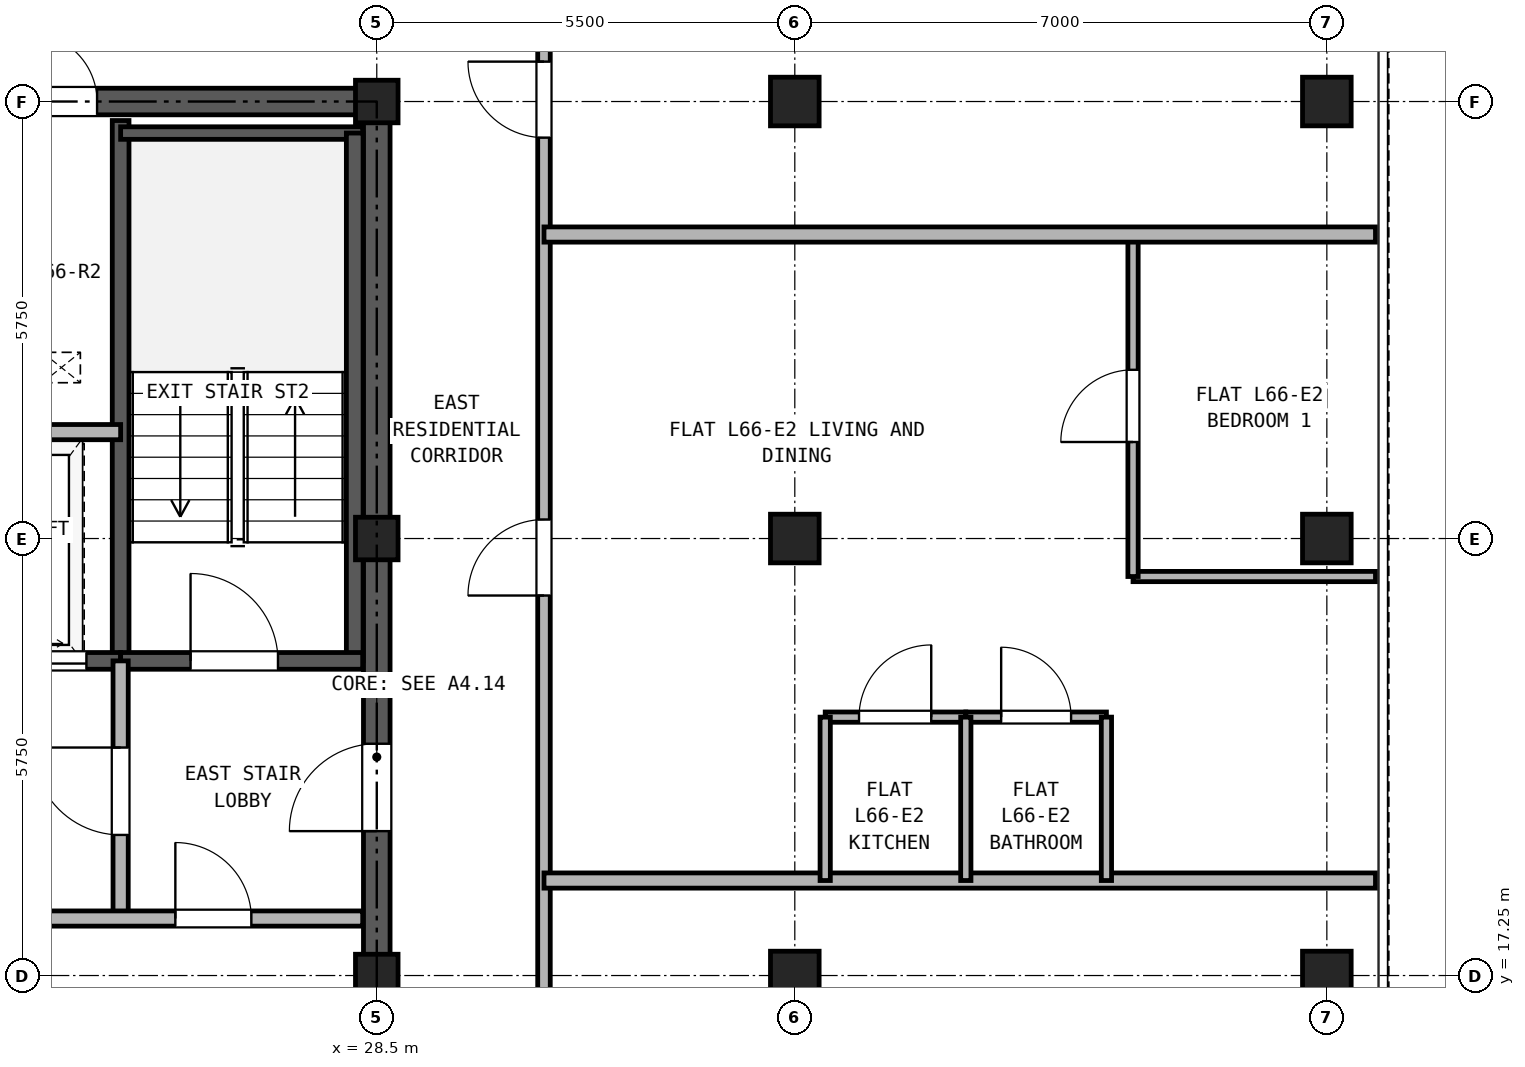
"""IFC4 building model, lengths in metres.
Left out: names, types, materials, properties, quantities, classifications, styles, units other than length and angle.
Written with IfcOpenShell. Run it as: python <this file> out.ifc"""

import sys

from ifc_helpers import new_model, si_unit, direction, frame, frame_2d, origin, origin_2d, place, context, subcontext, project, spatial, rectangle, hollow_rectangle, extrude, source, transform, mapped, element, fill, save


model = new_model("IFC4")
c1 = context("Model", 3, precision=1e-05, world=origin(), true_north=direction((0.0, 1.0)))
c2 = subcontext(c1, "Body", "Model", "MODEL_VIEW")
j1 = project(units=[si_unit("LENGTHUNIT", "METRE"), si_unit("PLANEANGLEUNIT", "RADIAN")], contexts=[c1])
p1 = place(None, origin())
s1 = spatial("IfcSite", under=j1, at=p1, CompositionType="ELEMENT")
p2 = place(p1, origin())
s2 = spatial("IfcBuilding", under=s1, at=p2, CompositionType="ELEMENT")
p3 = place(p2, frame((0.0, 0.0, 232.9)))
s3 = spatial("IfcBuildingStorey", under=s2, at=p3, CompositionType="ELEMENT", Elevation=232.9)
m1 = source(origin(), c2, "Body", "SweptSolid", [
    extrude(hollow_rectangle(XDim=0.64, YDim=0.64, WallThickness=0.035, at=origin_2d()), origin(), (0.0, 0.0, 1.0), 2.98),
])
for number, where, z_axis, x_axis in (
    (1, (41.0, 17.25, 0.0), (0.0, 0.0, 1.0), (1.0, 0.0, 0.0)),
    (2, (41.0, 23.0, 0.0), (0.0, 0.0, 1.0), (1.0, 0.0, 0.0)),
    (3, (41.0, 28.75, 0.0), (0.0, 0.0, 1.0), (1.0, 0.0, 0.0)),
):
    element("IfcColumn", number, at=place(p3, frame(where, z_axis=z_axis, x_axis=x_axis)), inside=s3, PredefinedType="COLUMN", context=c2, shape_type="MappedRepresentation", body=[
        mapped(m1, transform((0.0, 0.0, 0.0), x_axis=(1.0, 0.0, 0.0), y_axis=(0.0, 1.0, 0.0), z_axis=(0.0, 0.0, 1.0), scale=1.0)),
    ])
m2 = source(origin(), c2, "Body", "SweptSolid", [
    extrude(hollow_rectangle(XDim=0.56, YDim=0.56, WallThickness=0.03, at=origin_2d()), origin(), (0.0, 0.0, 1.0), 2.98),
])
for number, where, z_axis, x_axis in (
    (4, (28.5, 17.25, 0.0), (0.0, 0.0, 1.0), (1.0, 0.0, 0.0)),
    (5, (28.5, 23.0, 0.0), (0.0, 0.0, 1.0), (1.0, 0.0, 0.0)),
    (6, (28.5, 28.75, 0.0), (0.0, 0.0, 1.0), (1.0, 0.0, 0.0)),
):
    element("IfcColumn", number, at=place(p3, frame(where, z_axis=z_axis, x_axis=x_axis)), inside=s3, PredefinedType="COLUMN", context=c2, shape_type="MappedRepresentation", body=[
        mapped(m2, transform((0.0, 0.0, 0.0), x_axis=(1.0, 0.0, 0.0), y_axis=(0.0, 1.0, 0.0), z_axis=(0.0, 0.0, 1.0), scale=1.0)),
    ])
for number, where, z_axis, x_axis in (
    (7, (34.0, 17.25, 0.0), (0.0, 0.0, 1.0), (1.0, 0.0, 0.0)),
    (8, (34.0, 23.0, 0.0), (0.0, 0.0, 1.0), (1.0, 0.0, 0.0)),
    (9, (34.0, 28.75, 0.0), (0.0, 0.0, 1.0), (1.0, 0.0, 0.0)),
):
    element("IfcColumn", number, at=place(p3, frame(where, z_axis=z_axis, x_axis=x_axis)), inside=s3, PredefinedType="COLUMN", context=c2, shape_type="MappedRepresentation", body=[
        mapped(m1, transform((0.0, 0.0, 0.0), x_axis=(1.0, 0.0, 0.0), y_axis=(0.0, 1.0, 0.0), z_axis=(0.0, 0.0, 1.0), scale=1.0)),
    ])
p4 = place(p3, frame((18.325, 28.75, 0.0), z_axis=(0.0, 0.0, 1.0), x_axis=(1.0, 0.0, 0.0)))
e10 = element("IfcWall", 10, at=p4, inside=s3, PredefinedType="SHEAR", context=c2, shape_type="SweptSolid", body=[
    extrude(rectangle(XDim=10.35, YDim=0.35, at=frame_2d((5.175, 0.0))), origin(), (0.0, 0.0, 1.0), 2.98),
])
p5 = place(p4, frame((4.055, 0.0, 0.0)))
e11 = element("IfcOpeningElement", 11, at=p5, cuts=e10, PredefinedType="OPENING", context=c2, shape_type="SweptSolid", body=[
    extrude(rectangle(XDim=0.9, YDim=2.05, at=frame_2d((0.45, 1.025))), frame((0.0, 0.185, 0.0), z_axis=(0.0, -1.0, 0.0), x_axis=(1.0, 0.0, 0.0)), (0.0, 0.0, 1.0), 0.37),
])
p6 = place(p4, frame((5.595, 0.0, 0.0)))
e12 = element("IfcOpeningElement", 12, at=p6, cuts=e10, PredefinedType="OPENING", context=c2, shape_type="SweptSolid", body=[
    extrude(rectangle(XDim=0.9, YDim=2.05, at=frame_2d((0.45, 1.025))), frame((0.0, 0.185, 0.0), z_axis=(0.0, -1.0, 0.0), x_axis=(1.0, 0.0, 0.0)), (0.0, 0.0, 1.0), 0.37),
])
p7 = place(p3, frame((28.5, 11.675, 0.0), z_axis=(0.0, 0.0, 1.0), x_axis=(0.0, 1.0, 0.0)))
e13 = element("IfcWall", 13, at=p7, inside=s3, PredefinedType="SHEAR", context=c2, shape_type="SweptSolid", body=[
    extrude(rectangle(XDim=16.9, YDim=0.35, at=frame_2d((8.45, 0.0))), origin(), (0.0, 0.0, 1.0), 2.98),
])
p8 = place(p7, frame((7.475, 0.0, 0.0)))
e14 = element("IfcOpeningElement", 14, at=p8, cuts=e13, PredefinedType="OPENING", context=c2, shape_type="SweptSolid", body=[
    extrude(rectangle(XDim=1.15, YDim=2.2, at=frame_2d((0.575, 1.1))), frame((0.0, 0.185, 0.0), z_axis=(0.0, -1.0, 0.0), x_axis=(1.0, 0.0, 0.0)), (0.0, 0.0, 1.0), 0.37),
])
p9 = place(p3, frame((25.13, 21.39, 0.0), z_axis=(0.0, 0.0, 1.0), x_axis=(0.0, 1.0, 0.0)))
e15 = element("IfcWall", 15, at=p9, inside=s3, PredefinedType="SOLIDWALL", context=c2, shape_type="SweptSolid", body=[
    extrude(rectangle(XDim=7.11, YDim=0.22, at=frame_2d((3.555, 0.0))), origin(), (0.0, 0.0, 1.0), 2.98),
])
p10 = place(p3, frame((25.13, 28.335, 0.0), z_axis=(0.0, 0.0, 1.0), x_axis=(1.0, 0.0, 0.0)))
e16 = element("IfcWall", 16, at=p10, inside=s3, PredefinedType="PARTITIONING", context=c2, shape_type="SweptSolid", body=[
    extrude(rectangle(XDim=3.185, YDim=0.165, at=frame_2d((1.593, 0.0))), origin(), (0.0, 0.0, 1.0), 2.98),
])
p11 = place(p3, frame((28.21, 21.39, 0.0), z_axis=(0.0, 0.0, 1.0), x_axis=(0.0, 1.0, 0.0)))
e17 = element("IfcWall", 17, at=p11, inside=s3, PredefinedType="SOLIDWALL", context=c2, shape_type="SweptSolid", body=[
    extrude(rectangle(XDim=6.945, YDim=0.22, at=frame_2d((3.473, 0.0))), origin(), (0.0, 0.0, 1.0), 2.98),
])
p12 = place(p3, frame((18.685, 21.39, 0.0), z_axis=(0.0, 0.0, 1.0), x_axis=(1.0, 0.0, 0.0)))
e18 = element("IfcWall", 18, at=p12, inside=s3, PredefinedType="SOLIDWALL", context=c2, shape_type="SweptSolid", body=[
    extrude(rectangle(XDim=6.445, YDim=0.22, at=frame_2d((3.222, 0.0))), origin(), (0.0, 0.0, 1.0), 2.98),
])
p13 = place(p12, frame((1.165, 0.0, 0.0)))
e19 = element("IfcOpeningElement", 19, at=p13, cuts=e18, PredefinedType="OPENING", context=c2, shape_type="SweptSolid", body=[
    extrude(rectangle(XDim=1.15, YDim=2.2, at=frame_2d((0.575, 1.1))), frame((0.0, 0.12, 0.0), z_axis=(0.0, -1.0, 0.0), x_axis=(1.0, 0.0, 0.0)), (0.0, 0.0, 1.0), 0.24),
])
p14 = place(p12, frame((4.895, 0.0, 0.0)))
e20 = element("IfcOpeningElement", 20, at=p14, cuts=e18, PredefinedType="OPENING", context=c2, shape_type="SweptSolid", body=[
    extrude(rectangle(XDim=1.1, YDim=2.25, at=frame_2d((0.55, 1.125))), frame((0.0, 0.12, 0.0), z_axis=(0.0, -1.0, 0.0), x_axis=(1.0, 0.0, 0.0)), (0.0, 0.0, 1.0), 0.24),
])
p15 = place(p3, frame((25.13, 21.39, 0.0), z_axis=(0.0, 0.0, 1.0), x_axis=(1.0, 0.0, 0.0)))
e21 = element("IfcWall", 21, at=p15, inside=s3, PredefinedType="SOLIDWALL", context=c2, shape_type="SweptSolid", body=[
    extrude(rectangle(XDim=3.185, YDim=0.22, at=frame_2d((1.593, 0.0))), origin(), (0.0, 0.0, 1.0), 2.98),
])
p16 = place(p15, frame((0.92, 0.0, 0.0)))
e22 = element("IfcOpeningElement", 22, at=p16, cuts=e21, PredefinedType="OPENING", context=c2, shape_type="SweptSolid", body=[
    extrude(rectangle(XDim=1.15, YDim=2.2, at=frame_2d((0.575, 1.1))), frame((0.0, 0.12, 0.0), z_axis=(0.0, -1.0, 0.0), x_axis=(1.0, 0.0, 0.0)), (0.0, 0.0, 1.0), 0.24),
])
p17 = place(p3, frame((22.11, 24.4, 0.0), z_axis=(0.0, 0.0, 1.0), x_axis=(1.0, 0.0, 0.0)))
e23 = element("IfcWall", 23, at=p17, inside=s3, PredefinedType="PARTITIONING", context=c2, shape_type="SweptSolid", body=[
    extrude(rectangle(XDim=3.02, YDim=0.2, at=frame_2d((1.51, 0.0))), origin(), (0.0, 0.0, 1.0), 2.98),
])
p18 = place(p3, frame((25.13, 18.0, 0.0), z_axis=(0.0, 0.0, 1.0), x_axis=(0.0, 1.0, 0.0)))
e24 = element("IfcWall", 24, at=p18, inside=s3, PredefinedType="PARTITIONING", context=c2, shape_type="SweptSolid", body=[
    extrude(rectangle(XDim=3.39, YDim=0.2, at=frame_2d((1.695, 0.0))), origin(), (0.0, 0.0, 1.0), 2.98),
])
p19 = place(p18, frame((1.1, 0.0, 0.0)))
e25 = element("IfcOpeningElement", 25, at=p19, cuts=e24, PredefinedType="OPENING", context=c2, shape_type="SweptSolid", body=[
    extrude(rectangle(XDim=1.15, YDim=2.2, at=frame_2d((0.575, 1.1))), frame((0.0, 0.11, 0.0), z_axis=(0.0, -1.0, 0.0), x_axis=(1.0, 0.0, 0.0)), (0.0, 0.0, 1.0), 0.22),
])
p20 = place(p3, frame((18.685, 18.0, 0.0), z_axis=(0.0, 0.0, 1.0), x_axis=(1.0, 0.0, 0.0)))
e26 = element("IfcWall", 26, at=p20, inside=s3, PredefinedType="PARTITIONING", context=c2, shape_type="SweptSolid", body=[
    extrude(rectangle(XDim=9.63, YDim=0.2, at=frame_2d((4.815, 0.0))), origin(), (0.0, 0.0, 1.0), 2.98),
])
p21 = place(p20, frame((0.565, 0.0, 0.0)))
e27 = element("IfcOpeningElement", 27, at=p21, cuts=e26, PredefinedType="OPENING", context=c2, shape_type="SweptSolid", body=[
    extrude(rectangle(XDim=1.3, YDim=2.3, at=frame_2d((0.65, 1.15))), frame((0.0, 0.11, 0.0), z_axis=(0.0, -1.0, 0.0), x_axis=(1.0, 0.0, 0.0)), (0.0, 0.0, 1.0), 0.22),
])
p22 = place(p20, frame((2.665, 0.0, 0.0)))
e28 = element("IfcOpeningElement", 28, at=p22, cuts=e26, PredefinedType="OPENING", context=c2, shape_type="SweptSolid", body=[
    extrude(rectangle(XDim=1.3, YDim=2.3, at=frame_2d((0.65, 1.15))), frame((0.0, 0.11, 0.0), z_axis=(0.0, -1.0, 0.0), x_axis=(1.0, 0.0, 0.0)), (0.0, 0.0, 1.0), 0.22),
])
p23 = place(p20, frame((7.165, 0.0, 0.0)))
e29 = element("IfcOpeningElement", 29, at=p23, cuts=e26, PredefinedType="OPENING", context=c2, shape_type="SweptSolid", body=[
    extrude(rectangle(XDim=1.0, YDim=2.15, at=frame_2d((0.5, 1.075))), frame((0.0, 0.11, 0.0), z_axis=(0.0, -1.0, 0.0), x_axis=(1.0, 0.0, 0.0)), (0.0, 0.0, 1.0), 0.22),
])
p24 = place(p3, frame((30.7, 11.45, 0.0), z_axis=(0.0, 0.0, 1.0), x_axis=(0.0, 1.0, 0.0)))
e30 = element("IfcWall", 30, at=p24, inside=s3, PredefinedType="PARTITIONING", context=c2, shape_type="SweptSolid", body=[
    extrude(rectangle(XDim=23.69, YDim=0.165, at=frame_2d((11.845, 0.0))), origin(), (0.0, 0.0, 1.0), 2.98),
])
p25 = place(p24, frame((3.025, 0.0, 0.0)))
e31 = element("IfcOpeningElement", 31, at=p25, cuts=e30, PredefinedType="OPENING", context=c2, shape_type="SweptSolid", body=[
    extrude(rectangle(XDim=1.0, YDim=2.15, at=frame_2d((0.5, 1.075))), frame((0.0, 0.093, 0.0), z_axis=(0.0, -1.0, 0.0), x_axis=(1.0, 0.0, 0.0)), (0.0, 0.0, 1.0), 0.185),
])
p26 = place(p24, frame((10.8, 0.0, 0.0)))
e32 = element("IfcOpeningElement", 32, at=p26, cuts=e30, PredefinedType="OPENING", context=c2, shape_type="SweptSolid", body=[
    extrude(rectangle(XDim=1.0, YDim=2.15, at=frame_2d((0.5, 1.075))), frame((0.0, 0.093, 0.0), z_axis=(0.0, -1.0, 0.0), x_axis=(1.0, 0.0, 0.0)), (0.0, 0.0, 1.0), 0.185),
])
p27 = place(p24, frame((16.825, 0.0, 0.0)))
e33 = element("IfcOpeningElement", 33, at=p27, cuts=e30, PredefinedType="OPENING", context=c2, shape_type="SweptSolid", body=[
    extrude(rectangle(XDim=1.0, YDim=2.15, at=frame_2d((0.5, 1.075))), frame((0.0, 0.093, 0.0), z_axis=(0.0, -1.0, 0.0), x_axis=(1.0, 0.0, 0.0)), (0.0, 0.0, 1.0), 0.185),
])
p28 = place(p3, frame((30.7, 18.5, 0.0), z_axis=(0.0, 0.0, 1.0), x_axis=(1.0, 0.0, 0.0)))
e34 = element("IfcWall", 34, at=p28, inside=s3, PredefinedType="PARTITIONING", context=c2, shape_type="SweptSolid", body=[
    extrude(rectangle(XDim=10.94, YDim=0.2, at=frame_2d((5.47, 0.0))), origin(), (0.0, 0.0, 1.0), 2.98),
])
p29 = place(p3, frame((34.4, 20.65, 0.0), z_axis=(0.0, 0.0, 1.0), x_axis=(1.0, 0.0, 0.0)))
e35 = element("IfcWall", 35, at=p29, inside=s3, PredefinedType="PARTITIONING", context=c2, shape_type="SweptSolid", body=[
    extrude(rectangle(XDim=1.85, YDim=0.135, at=frame_2d((0.925, 0.0))), origin(), (0.0, 0.0, 1.0), 2.98),
])
p30 = place(p29, frame((0.445, 0.0, 0.0)))
e36 = element("IfcOpeningElement", 36, at=p30, cuts=e35, PredefinedType="OPENING", context=c2, shape_type="SweptSolid", body=[
    extrude(rectangle(XDim=0.95, YDim=2.15, at=frame_2d((0.475, 1.075))), frame((0.0, 0.077, 0.0), z_axis=(0.0, -1.0, 0.0), x_axis=(1.0, 0.0, 0.0)), (0.0, 0.0, 1.0), 0.155),
])
p31 = place(p3, frame((36.25, 20.65, 0.0), z_axis=(0.0, 0.0, 1.0), x_axis=(1.0, 0.0, 0.0)))
e37 = element("IfcWall", 37, at=p31, inside=s3, PredefinedType="PARTITIONING", context=c2, shape_type="SweptSolid", body=[
    extrude(rectangle(XDim=1.85, YDim=0.135, at=frame_2d((0.925, 0.0))), origin(), (0.0, 0.0, 1.0), 2.98),
])
p32 = place(p31, frame((0.465, 0.0, 0.0)))
e38 = element("IfcOpeningElement", 38, at=p32, cuts=e37, PredefinedType="OPENING", context=c2, shape_type="SweptSolid", body=[
    extrude(rectangle(XDim=0.92, YDim=2.1, at=frame_2d((0.46, 1.05))), frame((0.0, 0.077, 0.0), z_axis=(0.0, -1.0, 0.0), x_axis=(1.0, 0.0, 0.0)), (0.0, 0.0, 1.0), 0.155),
])
for number, where, z_axis, x_axis in (
    (39, (34.4, 18.5, 0.0), (0.0, 0.0, 1.0), (0.0, 1.0, 0.0)),
    (40, (36.25, 18.5, 0.0), (0.0, 0.0, 1.0), (0.0, 1.0, 0.0)),
    (41, (38.1, 18.5, 0.0), (0.0, 0.0, 1.0), (0.0, 1.0, 0.0)),
):
    element("IfcWall", number, at=place(p3, frame(where, z_axis=z_axis, x_axis=x_axis)), inside=s3, PredefinedType="PARTITIONING", context=c2, shape_type="SweptSolid", body=[
        extrude(rectangle(XDim=2.15, YDim=0.135, at=frame_2d((1.075, 0.0))), origin(), (0.0, 0.0, 1.0), 2.98),
    ])
p33 = place(p3, frame((38.45, 22.5, 0.0), z_axis=(0.0, 0.0, 1.0), x_axis=(1.0, 0.0, 0.0)))
e42 = element("IfcWall", 42, at=p33, inside=s3, PredefinedType="PARTITIONING", context=c2, shape_type="SweptSolid", body=[
    extrude(rectangle(XDim=3.19, YDim=0.135, at=frame_2d((1.595, 0.0))), origin(), (0.0, 0.0, 1.0), 2.98),
])
p34 = place(p3, frame((38.45, 22.5, 0.0), z_axis=(0.0, 0.0, 1.0), x_axis=(0.0, 1.0, 0.0)))
e43 = element("IfcWall", 43, at=p34, inside=s3, PredefinedType="PARTITIONING", context=c2, shape_type="SweptSolid", body=[
    extrude(rectangle(XDim=4.5, YDim=0.135, at=frame_2d((2.25, 0.0))), origin(), (0.0, 0.0, 1.0), 2.98),
])
p35 = place(p34, frame((1.77, 0.0, 0.0)))
e44 = element("IfcOpeningElement", 44, at=p35, cuts=e43, PredefinedType="OPENING", context=c2, shape_type="SweptSolid", body=[
    extrude(rectangle(XDim=0.95, YDim=2.15, at=frame_2d((0.475, 1.075))), frame((0.0, 0.077, 0.0), z_axis=(0.0, -1.0, 0.0), x_axis=(1.0, 0.0, 0.0)), (0.0, 0.0, 1.0), 0.155),
])
p36 = place(p3, frame((30.7, 27.0, 0.0), z_axis=(0.0, 0.0, 1.0), x_axis=(1.0, 0.0, 0.0)))
e45 = element("IfcWall", 45, at=p36, inside=s3, PredefinedType="PARTITIONING", context=c2, shape_type="SweptSolid", body=[
    extrude(rectangle(XDim=10.94, YDim=0.2, at=frame_2d((5.47, 0.0))), origin(), (0.0, 0.0, 1.0), 2.98),
])
p37 = place(p16, frame((1.15, 0.0, 0.0), z_axis=(0.0, 0.0, 1.0), x_axis=(-1.0, 0.0, 0.0)))
e46 = element("IfcDoor", 46, at=p37, inside=s3, OperationType="SINGLE_SWING_LEFT", PredefinedType="DOOR", context=c2, shape_type="SweptSolid", body=[
    extrude(rectangle(XDim=1.15, YDim=2.2, at=frame_2d((0.575, 1.1))), frame((0.0, 0.025, 0.0), z_axis=(0.0, -1.0, 0.0), x_axis=(1.0, 0.0, 0.0)), (0.0, 0.0, 1.0), 0.05),
])
fill(e22, e46)
p38 = place(p14, frame((1.1, 0.0, 0.0), z_axis=(0.0, 0.0, 1.0), x_axis=(-1.0, 0.0, 0.0)))
e47 = element("IfcDoor", 47, at=p38, inside=s3, OperationType="DOUBLE_DOOR_SLIDING", PredefinedType="DOOR", context=c2, shape_type="SweptSolid", body=[
    extrude(rectangle(XDim=1.1, YDim=2.25, at=frame_2d((0.55, 1.125))), frame((0.0, 0.025, 0.0), z_axis=(0.0, -1.0, 0.0), x_axis=(1.0, 0.0, 0.0)), (0.0, 0.0, 1.0), 0.05),
])
fill(e20, e47)
p39 = place(p19, origin())
e48 = element("IfcDoor", 48, at=p39, inside=s3, OperationType="SINGLE_SWING_RIGHT", PredefinedType="DOOR", context=c2, shape_type="SweptSolid", body=[
    extrude(rectangle(XDim=1.15, YDim=2.2, at=frame_2d((0.575, 1.1))), frame((0.0, 0.025, 0.0), z_axis=(0.0, -1.0, 0.0), x_axis=(1.0, 0.0, 0.0)), (0.0, 0.0, 1.0), 0.05),
])
fill(e25, e48)
p40 = place(p23, frame((1.0, 0.0, 0.0), z_axis=(0.0, 0.0, 1.0), x_axis=(-1.0, 0.0, 0.0)))
e49 = element("IfcDoor", 49, at=p40, inside=s3, OperationType="SINGLE_SWING_LEFT", PredefinedType="DOOR", context=c2, shape_type="SweptSolid", body=[
    extrude(rectangle(XDim=1.0, YDim=2.15, at=frame_2d((0.5, 1.075))), frame((0.0, 0.025, 0.0), z_axis=(0.0, -1.0, 0.0), x_axis=(1.0, 0.0, 0.0)), (0.0, 0.0, 1.0), 0.05),
])
fill(e29, e49)
p41 = place(p8, origin())
e50 = element("IfcDoor", 50, at=p41, inside=s3, OperationType="SINGLE_SWING_LEFT", PredefinedType="DOOR", context=c2, shape_type="SweptSolid", body=[
    extrude(rectangle(XDim=1.15, YDim=2.2, at=frame_2d((0.575, 1.1))), frame((0.0, 0.025, 0.0), z_axis=(0.0, -1.0, 0.0), x_axis=(1.0, 0.0, 0.0)), (0.0, 0.0, 1.0), 0.05),
])
fill(e14, e50)
p42 = place(p6, origin())
e51 = element("IfcDoor", 51, at=p42, inside=s3, OperationType="SINGLE_SWING_LEFT", PredefinedType="DOOR", context=c2, shape_type="SweptSolid", body=[
    extrude(rectangle(XDim=0.9, YDim=2.05, at=frame_2d((0.45, 1.025))), frame((0.0, 0.025, 0.0), z_axis=(0.0, -1.0, 0.0), x_axis=(1.0, 0.0, 0.0)), (0.0, 0.0, 1.0), 0.05),
])
fill(e12, e51)
p43 = place(p30, origin())
e52 = element("IfcDoor", 52, at=p43, inside=s3, OperationType="SINGLE_SWING_RIGHT", PredefinedType="DOOR", context=c2, shape_type="SweptSolid", body=[
    extrude(rectangle(XDim=0.95, YDim=2.15, at=frame_2d((0.475, 1.075))), frame((0.0, 0.025, 0.0), z_axis=(0.0, -1.0, 0.0), x_axis=(1.0, 0.0, 0.0)), (0.0, 0.0, 1.0), 0.05),
])
fill(e36, e52)
p44 = place(p32, origin())
e53 = element("IfcDoor", 53, at=p44, inside=s3, OperationType="SINGLE_SWING_LEFT", PredefinedType="DOOR", context=c2, shape_type="SweptSolid", body=[
    extrude(rectangle(XDim=0.92, YDim=2.1, at=frame_2d((0.46, 1.05))), frame((0.0, 0.025, 0.0), z_axis=(0.0, -1.0, 0.0), x_axis=(1.0, 0.0, 0.0)), (0.0, 0.0, 1.0), 0.05),
])
fill(e38, e53)
p45 = place(p35, frame((0.95, 0.0, 0.0), z_axis=(0.0, 0.0, 1.0), x_axis=(-1.0, 0.0, 0.0)))
e54 = element("IfcDoor", 54, at=p45, inside=s3, OperationType="SINGLE_SWING_LEFT", PredefinedType="DOOR", context=c2, shape_type="SweptSolid", body=[
    extrude(rectangle(XDim=0.95, YDim=2.15, at=frame_2d((0.475, 1.075))), frame((0.0, 0.025, 0.0), z_axis=(0.0, -1.0, 0.0), x_axis=(1.0, 0.0, 0.0)), (0.0, 0.0, 1.0), 0.05),
])
fill(e44, e54)
p46 = place(p26, frame((1.0, 0.0, 0.0), z_axis=(0.0, 0.0, 1.0), x_axis=(-1.0, 0.0, 0.0)))
e55 = element("IfcDoor", 55, at=p46, inside=s3, OperationType="SINGLE_SWING_LEFT", PredefinedType="DOOR", context=c2, shape_type="SweptSolid", body=[
    extrude(rectangle(XDim=1.0, YDim=2.15, at=frame_2d((0.5, 1.075))), frame((0.0, 0.025, 0.0), z_axis=(0.0, -1.0, 0.0), x_axis=(1.0, 0.0, 0.0)), (0.0, 0.0, 1.0), 0.05),
])
fill(e32, e55)
p47 = place(p27, frame((1.0, 0.0, 0.0), z_axis=(0.0, 0.0, 1.0), x_axis=(-1.0, 0.0, 0.0)))
e56 = element("IfcDoor", 56, at=p47, inside=s3, OperationType="SINGLE_SWING_RIGHT", PredefinedType="DOOR", context=c2, shape_type="SweptSolid", body=[
    extrude(rectangle(XDim=1.0, YDim=2.15, at=frame_2d((0.5, 1.075))), frame((0.0, 0.025, 0.0), z_axis=(0.0, -1.0, 0.0), x_axis=(1.0, 0.0, 0.0)), (0.0, 0.0, 1.0), 0.05),
])
fill(e33, e56)
save(model, sys.argv[1])
